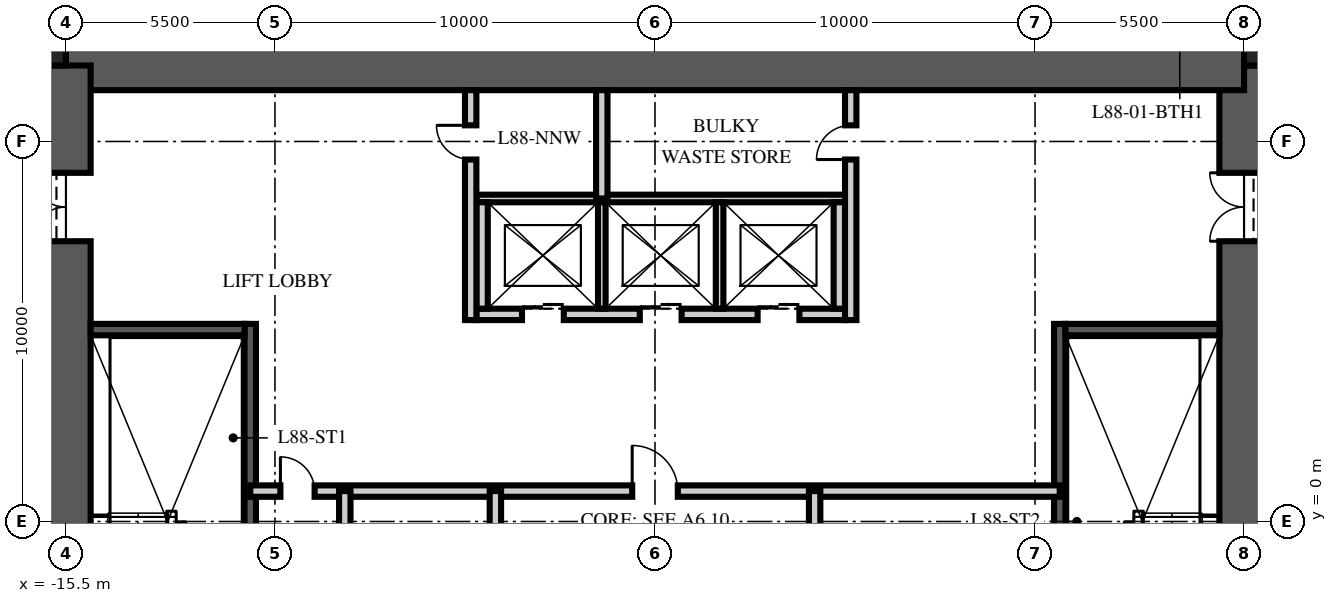
"""IFC4 building model, lengths in metres.
Left out: names, types, materials, properties, quantities, classifications, styles, units other than length and angle.
Written with IfcOpenShell. Run it as: python <this file> out.ifc"""

import sys

from ifc_helpers import new_model, si_unit, direction, frame, frame_2d, origin, origin_2d, place, context, subcontext, project, spatial, rectangle, extrude, element, fill, save


model = new_model("IFC4")
c1 = context("Model", 3, precision=1e-05, world=origin(), true_north=direction((0.0, 1.0)))
c2 = subcontext(c1, "Body", "Model", "MODEL_VIEW")
j1 = project(units=[si_unit("LENGTHUNIT", "METRE"), si_unit("PLANEANGLEUNIT", "RADIAN")], contexts=[c1])
p1 = place(None, origin())
s1 = spatial("IfcSite", under=j1, at=p1, CompositionType="ELEMENT")
p2 = place(p1, origin())
s2 = spatial("IfcBuilding", under=s1, at=p2, CompositionType="ELEMENT")
p3 = place(p2, frame((0.0, 0.0, 349.5)))
s3 = spatial("IfcBuildingStorey", under=s2, at=p3, CompositionType="ELEMENT", Elevation=349.5)
p4 = place(p3, frame((15.5, -12.0, -0.25), z_axis=(0.0, 0.0, 1.0), x_axis=(0.0, 1.0, 0.0)))
e1 = element("IfcWall", 1, at=p4, inside=s3, PredefinedType="SHEAR", context=c2, shape_type="SweptSolid", body=[
    extrude(rectangle(XDim=24.0, YDim=1.3, at=frame_2d((12.0, 0.0))), origin(), (0.0, 0.0, 1.0), 3.7),
])
p5 = place(p4, frame((3.125, 0.0, 0.25)))
e2 = element("IfcOpeningElement", 2, at=p5, cuts=e1, PredefinedType="OPENING", context=c2, shape_type="SweptSolid", body=[
    extrude(rectangle(XDim=1.2, YDim=2.1, at=frame_2d((0.6, 1.05))), frame((0.0, 0.66, 0.0), z_axis=(0.0, -1.0, 0.0), x_axis=(1.0, 0.0, 0.0)), (0.0, 0.0, 1.0), 1.32),
])
p6 = place(p4, frame((19.375, 0.0, 0.25)))
e3 = element("IfcOpeningElement", 3, at=p6, cuts=e1, PredefinedType="OPENING", context=c2, shape_type="SweptSolid", body=[
    extrude(rectangle(XDim=1.8, YDim=2.1, at=frame_2d((0.9, 1.05))), frame((0.0, 0.66, 0.0), z_axis=(0.0, -1.0, 0.0), x_axis=(1.0, 0.0, 0.0)), (0.0, 0.0, 1.0), 1.32),
])
p7 = place(p3, frame((-15.5, 12.0, -0.25), z_axis=(0.0, 0.0, 1.0), x_axis=(1.0, 0.0, 0.0)))
e4 = element("IfcWall", 4, at=p7, inside=s3, PredefinedType="SHEAR", context=c2, shape_type="SweptSolid", body=[
    extrude(rectangle(XDim=31.0, YDim=1.3, at=frame_2d((15.5, 0.0))), origin(), (0.0, 0.0, 1.0), 3.7),
])
p8 = place(p3, frame((-15.5, -12.0, -0.25), z_axis=(0.0, 0.0, 1.0), x_axis=(0.0, 1.0, 0.0)))
e5 = element("IfcWall", 5, at=p8, inside=s3, PredefinedType="SHEAR", context=c2, shape_type="SweptSolid", body=[
    extrude(rectangle(XDim=24.0, YDim=1.3, at=frame_2d((12.0, 0.0))), origin(), (0.0, 0.0, 1.0), 3.7),
])
p9 = place(p8, frame((3.125, 0.0, 0.25)))
e6 = element("IfcOpeningElement", 6, at=p9, cuts=e5, PredefinedType="OPENING", context=c2, shape_type="SweptSolid", body=[
    extrude(rectangle(XDim=1.2, YDim=2.1, at=frame_2d((0.6, 1.05))), frame((0.0, 0.66, 0.0), z_axis=(0.0, -1.0, 0.0), x_axis=(1.0, 0.0, 0.0)), (0.0, 0.0, 1.0), 1.32),
])
p10 = place(p8, frame((19.375, 0.0, 0.25)))
e7 = element("IfcOpeningElement", 7, at=p10, cuts=e5, PredefinedType="OPENING", context=c2, shape_type="SweptSolid", body=[
    extrude(rectangle(XDim=1.8, YDim=2.1, at=frame_2d((0.9, 1.05))), frame((0.0, 0.66, 0.0), z_axis=(0.0, -1.0, 0.0), x_axis=(1.0, 0.0, 0.0)), (0.0, 0.0, 1.0), 1.32),
])
for number, where, z_axis, x_axis in (
    (8, (15.825, 12.325, -0.25), (0.0, 0.0, 1.0), (1.0, 0.0, 0.0)),
    (9, (-15.825, 12.325, -0.25), (0.0, 0.0, 1.0), (1.0, 0.0, 0.0)),
):
    element("IfcColumn", number, at=place(p3, frame(where, z_axis=z_axis, x_axis=x_axis)), inside=s3, PredefinedType="COLUMN", context=c2, shape_type="SweptSolid", body=[
        extrude(rectangle(XDim=0.65, YDim=0.65, at=origin_2d()), origin(), (0.0, 0.0, 1.0), 3.7),
    ])
p11 = place(p3, frame((-10.65, -4.9, 0.0), z_axis=(0.0, 0.0, 1.0), x_axis=(0.0, 1.0, 0.0)))
e10 = element("IfcWall", 10, at=p11, inside=s3, PredefinedType="SOLIDWALL", context=c2, shape_type="SweptSolid", body=[
    extrude(rectangle(XDim=10.1, YDim=0.3, at=frame_2d((5.05, 0.0))), origin(), (0.0, 0.0, 1.0), 3.45),
])
p12 = place(p3, frame((-14.85, 5.05, 0.0), z_axis=(0.0, 0.0, 1.0), x_axis=(1.0, 0.0, 0.0)))
e11 = element("IfcWall", 11, at=p12, inside=s3, PredefinedType="SOLIDWALL", context=c2, shape_type="SweptSolid", body=[
    extrude(rectangle(XDim=4.05, YDim=0.3, at=frame_2d((2.025, 0.0))), origin(), (0.0, 0.0, 1.0), 3.45),
])
p13 = place(p3, frame((10.65, -4.9, 0.0), z_axis=(0.0, 0.0, 1.0), x_axis=(0.0, 1.0, 0.0)))
e12 = element("IfcWall", 12, at=p13, inside=s3, PredefinedType="SOLIDWALL", context=c2, shape_type="SweptSolid", body=[
    extrude(rectangle(XDim=10.1, YDim=0.3, at=frame_2d((5.05, 0.0))), origin(), (0.0, 0.0, 1.0), 3.45),
])
p14 = place(p3, frame((14.85, 5.05, 0.0), z_axis=(0.0, 0.0, 1.0), x_axis=(-1.0, 0.0, 0.0)))
e13 = element("IfcWall", 13, at=p14, inside=s3, PredefinedType="SOLIDWALL", context=c2, shape_type="SweptSolid", body=[
    extrude(rectangle(XDim=4.05, YDim=0.3, at=frame_2d((2.025, 0.0))), origin(), (0.0, 0.0, 1.0), 3.45),
])
p15 = place(p3, frame((-4.7, 5.45, 0.0), z_axis=(0.0, 0.0, 1.0), x_axis=(1.0, 0.0, 0.0)))
e14 = element("IfcWall", 14, at=p15, inside=s3, PredefinedType="PARTITIONING", context=c2, shape_type="SweptSolid", body=[
    extrude(rectangle(XDim=9.7, YDim=0.3, at=frame_2d((4.85, 0.0))), origin(), (0.0, 0.0, 1.0), 3.45),
])
p16 = place(p15, frame((1.2, 0.0, 0.0)))
e15 = element("IfcOpeningElement", 15, at=p16, cuts=e14, PredefinedType="OPENING", context=c2, shape_type="SweptSolid", body=[
    extrude(rectangle(XDim=1.1, YDim=2.1, at=frame_2d((0.55, 1.05))), frame((0.0, 0.16, 0.0), z_axis=(0.0, -1.0, 0.0), x_axis=(1.0, 0.0, 0.0)), (0.0, 0.0, 1.0), 0.32),
])
p17 = place(p15, frame((4.3, 0.0, 0.0)))
e16 = element("IfcOpeningElement", 16, at=p17, cuts=e14, PredefinedType="OPENING", context=c2, shape_type="SweptSolid", body=[
    extrude(rectangle(XDim=1.1, YDim=2.1, at=frame_2d((0.55, 1.05))), frame((0.0, 0.16, 0.0), z_axis=(0.0, -1.0, 0.0), x_axis=(1.0, 0.0, 0.0)), (0.0, 0.0, 1.0), 0.32),
])
p18 = place(p15, frame((7.4, 0.0, 0.0)))
e17 = element("IfcOpeningElement", 17, at=p18, cuts=e14, PredefinedType="OPENING", context=c2, shape_type="SweptSolid", body=[
    extrude(rectangle(XDim=1.1, YDim=2.1, at=frame_2d((0.55, 1.05))), frame((0.0, 0.16, 0.0), z_axis=(0.0, -1.0, 0.0), x_axis=(1.0, 0.0, 0.0)), (0.0, 0.0, 1.0), 0.32),
])
p19 = place(p3, frame((-4.7, 8.5, 0.0), z_axis=(0.0, 0.0, 1.0), x_axis=(1.0, 0.0, 0.0)))
e18 = element("IfcWall", 18, at=p19, inside=s3, PredefinedType="PARTITIONING", context=c2, shape_type="SweptSolid", body=[
    extrude(rectangle(XDim=9.7, YDim=0.2, at=frame_2d((4.85, 0.0))), origin(), (0.0, 0.0, 1.0), 3.45),
])
for number, where, z_axis, x_axis in (
    (19, (-4.55, 5.6, 0.0), (0.0, 0.0, 1.0), (0.0, 1.0, 0.0)),
    (20, (4.85, 5.6, 0.0), (0.0, 0.0, 1.0), (0.0, 1.0, 0.0)),
):
    element("IfcWall", number, at=place(p3, frame(where, z_axis=z_axis, x_axis=x_axis)), inside=s3, PredefinedType="PARTITIONING", context=c2, shape_type="SweptSolid", body=[
        extrude(rectangle(XDim=2.8, YDim=0.3, at=frame_2d((1.4, 0.0))), origin(), (0.0, 0.0, 1.0), 3.45),
    ])
for number, where, z_axis, x_axis in (
    (21, (-1.4, 5.6, 0.0), (0.0, 0.0, 1.0), (0.0, 1.0, 0.0)),
    (22, (1.7, 5.6, 0.0), (0.0, 0.0, 1.0), (0.0, 1.0, 0.0)),
):
    element("IfcWall", number, at=place(p3, frame(where, z_axis=z_axis, x_axis=x_axis)), inside=s3, PredefinedType="PARTITIONING", context=c2, shape_type="SweptSolid", body=[
        extrude(rectangle(XDim=2.8, YDim=0.2, at=frame_2d((1.4, 0.0))), origin(), (0.0, 0.0, 1.0), 3.45),
    ])
p20 = place(p3, frame((-10.65, 0.8, 0.0), z_axis=(0.0, 0.0, 1.0), x_axis=(1.0, 0.0, 0.0)))
e23 = element("IfcWall", 23, at=p20, inside=s3, PredefinedType="PARTITIONING", context=c2, shape_type="SweptSolid", body=[
    extrude(rectangle(XDim=21.3, YDim=0.3, at=frame_2d((10.65, 0.0))), origin(), (0.0, 0.0, 1.0), 3.45),
])
p21 = place(p20, frame((10.05, 0.0, 0.0)))
e24 = element("IfcOpeningElement", 24, at=p21, cuts=e23, PredefinedType="OPENING", context=c2, shape_type="SweptSolid", body=[
    extrude(rectangle(XDim=1.2, YDim=2.1, at=frame_2d((0.6, 1.05))), frame((0.0, 0.16, 0.0), z_axis=(0.0, -1.0, 0.0), x_axis=(1.0, 0.0, 0.0)), (0.0, 0.0, 1.0), 0.32),
])
p22 = place(p20, frame((0.793, 0.0, 0.0)))
e25 = element("IfcOpeningElement", 25, at=p22, cuts=e23, PredefinedType="OPENING", context=c2, shape_type="SweptSolid", body=[
    extrude(rectangle(XDim=0.9, YDim=2.1, at=frame_2d((0.45, 1.05))), frame((0.0, 0.16, 0.0), z_axis=(0.0, -1.0, 0.0), x_axis=(1.0, 0.0, 0.0)), (0.0, 0.0, 1.0), 0.32),
])
p23 = place(p3, frame((-4.2, -6.65, 0.0), z_axis=(0.0, 0.0, 1.0), x_axis=(0.0, 1.0, 0.0)))
e26 = element("IfcWall", 26, at=p23, inside=s3, PredefinedType="PARTITIONING", context=c2, shape_type="SweptSolid", body=[
    extrude(rectangle(XDim=7.45, YDim=0.3, at=frame_2d((3.725, 0.0))), origin(), (0.0, 0.0, 1.0), 3.45),
])
p24 = place(p23, frame((3.275, 0.0, 0.0)))
e27 = element("IfcOpeningElement", 27, at=p24, cuts=e26, PredefinedType="OPENING", context=c2, shape_type="SweptSolid", body=[
    extrude(rectangle(XDim=0.9, YDim=2.1, at=frame_2d((0.45, 1.05))), frame((0.0, 0.16, 0.0), z_axis=(0.0, -1.0, 0.0), x_axis=(1.0, 0.0, 0.0)), (0.0, 0.0, 1.0), 0.32),
])
p25 = place(p3, frame((4.2, -6.65, 0.0), z_axis=(0.0, 0.0, 1.0), x_axis=(0.0, 1.0, 0.0)))
e28 = element("IfcWall", 28, at=p25, inside=s3, PredefinedType="PARTITIONING", context=c2, shape_type="SweptSolid", body=[
    extrude(rectangle(XDim=7.45, YDim=0.3, at=frame_2d((3.725, 0.0))), origin(), (0.0, 0.0, 1.0), 3.45),
])
p26 = place(p25, frame((0.866, 0.0, 0.0)))
e29 = element("IfcOpeningElement", 29, at=p26, cuts=e28, PredefinedType="OPENING", context=c2, shape_type="SweptSolid", body=[
    extrude(rectangle(XDim=0.9, YDim=2.1, at=frame_2d((0.45, 1.05))), frame((0.0, 0.16, 0.0), z_axis=(0.0, -1.0, 0.0), x_axis=(1.0, 0.0, 0.0)), (0.0, 0.0, 1.0), 0.32),
])
p27 = place(p25, frame((4.591, 0.0, 0.0)))
e30 = element("IfcOpeningElement", 30, at=p27, cuts=e28, PredefinedType="OPENING", context=c2, shape_type="SweptSolid", body=[
    extrude(rectangle(XDim=0.9, YDim=2.1, at=frame_2d((0.45, 1.05))), frame((0.0, 0.16, 0.0), z_axis=(0.0, -1.0, 0.0), x_axis=(1.0, 0.0, 0.0)), (0.0, 0.0, 1.0), 0.32),
])
p28 = place(p3, frame((-8.163, -6.65, 0.0), z_axis=(0.0, 0.0, 1.0), x_axis=(0.0, 1.0, 0.0)))
e31 = element("IfcWall", 31, at=p28, inside=s3, PredefinedType="PARTITIONING", context=c2, shape_type="SweptSolid", body=[
    extrude(rectangle(XDim=7.45, YDim=0.3, at=frame_2d((3.725, 0.0))), origin(), (0.0, 0.0, 1.0), 3.45),
])
p29 = place(p3, frame((-4.85, 5.3, 0.0), z_axis=(0.0, 0.0, 1.0), x_axis=(0.0, 1.0, 0.0)))
e32 = element("IfcWall", 32, at=p29, inside=s3, PredefinedType="PARTITIONING", context=c2, shape_type="SweptSolid", body=[
    extrude(rectangle(XDim=6.05, YDim=0.3, at=frame_2d((3.025, 0.0))), origin(), (0.0, 0.0, 1.0), 3.45),
])
p30 = place(p29, frame((4.225, 0.0, 0.0)))
e33 = element("IfcOpeningElement", 33, at=p30, cuts=e32, PredefinedType="OPENING", context=c2, shape_type="SweptSolid", body=[
    extrude(rectangle(XDim=0.9, YDim=2.1, at=frame_2d((0.45, 1.05))), frame((0.0, 0.16, 0.0), z_axis=(0.0, -1.0, 0.0), x_axis=(1.0, 0.0, 0.0)), (0.0, 0.0, 1.0), 0.32),
])
p31 = place(p3, frame((5.15, 5.3, 0.0), z_axis=(0.0, 0.0, 1.0), x_axis=(0.0, 1.0, 0.0)))
e34 = element("IfcWall", 34, at=p31, inside=s3, PredefinedType="PARTITIONING", context=c2, shape_type="SweptSolid", body=[
    extrude(rectangle(XDim=6.05, YDim=0.3, at=frame_2d((3.025, 0.0))), origin(), (0.0, 0.0, 1.0), 3.45),
])
p32 = place(p31, frame((4.225, 0.0, 0.0)))
e35 = element("IfcOpeningElement", 35, at=p32, cuts=e34, PredefinedType="OPENING", context=c2, shape_type="SweptSolid", body=[
    extrude(rectangle(XDim=0.9, YDim=2.1, at=frame_2d((0.45, 1.05))), frame((0.0, 0.16, 0.0), z_axis=(0.0, -1.0, 0.0), x_axis=(1.0, 0.0, 0.0)), (0.0, 0.0, 1.0), 0.32),
])
p33 = place(p3, frame((-1.4, 8.5, 0.0), z_axis=(0.0, 0.0, 1.0), x_axis=(0.0, 1.0, 0.0)))
e36 = element("IfcWall", 36, at=p33, inside=s3, PredefinedType="PARTITIONING", context=c2, shape_type="SweptSolid", body=[
    extrude(rectangle(XDim=2.85, YDim=0.3, at=frame_2d((1.425, 0.0))), origin(), (0.0, 0.0, 1.0), 3.45),
])
p34 = place(p10, origin())
e37 = element("IfcDoor", 37, at=p34, inside=s3, OperationType="DOUBLE_DOOR_SINGLE_SWING", PredefinedType="DOOR", context=c2, shape_type="SweptSolid", body=[
    extrude(rectangle(XDim=1.8, YDim=2.1, at=frame_2d((0.9, 1.05))), frame((0.0, 0.025, 0.0), z_axis=(0.0, -1.0, 0.0), x_axis=(1.0, 0.0, 0.0)), (0.0, 0.0, 1.0), 0.05),
])
fill(e7, e37)
p35 = place(p6, origin())
e38 = element("IfcDoor", 38, at=p35, inside=s3, OperationType="DOUBLE_DOOR_SINGLE_SWING", PredefinedType="DOOR", context=c2, shape_type="SweptSolid", body=[
    extrude(rectangle(XDim=1.8, YDim=2.1, at=frame_2d((0.9, 1.05))), frame((0.0, 0.025, 0.0), z_axis=(0.0, -1.0, 0.0), x_axis=(1.0, 0.0, 0.0)), (0.0, 0.0, 1.0), 0.05),
])
fill(e3, e38)
p36 = place(p16, origin())
e39 = element("IfcDoor", 39, at=p36, inside=s3, OperationType="DOUBLE_DOOR_SLIDING", PredefinedType="DOOR", context=c2, shape_type="SweptSolid", body=[
    extrude(rectangle(XDim=1.1, YDim=2.1, at=frame_2d((0.55, 1.05))), frame((0.0, 0.025, 0.0), z_axis=(0.0, -1.0, 0.0), x_axis=(1.0, 0.0, 0.0)), (0.0, 0.0, 1.0), 0.05),
])
fill(e15, e39)
p37 = place(p17, origin())
e40 = element("IfcDoor", 40, at=p37, inside=s3, OperationType="DOUBLE_DOOR_SLIDING", PredefinedType="DOOR", context=c2, shape_type="SweptSolid", body=[
    extrude(rectangle(XDim=1.1, YDim=2.1, at=frame_2d((0.55, 1.05))), frame((0.0, 0.025, 0.0), z_axis=(0.0, -1.0, 0.0), x_axis=(1.0, 0.0, 0.0)), (0.0, 0.0, 1.0), 0.05),
])
fill(e16, e40)
p38 = place(p18, origin())
e41 = element("IfcDoor", 41, at=p38, inside=s3, OperationType="DOUBLE_DOOR_SLIDING", PredefinedType="DOOR", context=c2, shape_type="SweptSolid", body=[
    extrude(rectangle(XDim=1.1, YDim=2.1, at=frame_2d((0.55, 1.05))), frame((0.0, 0.025, 0.0), z_axis=(0.0, -1.0, 0.0), x_axis=(1.0, 0.0, 0.0)), (0.0, 0.0, 1.0), 0.05),
])
fill(e17, e41)
p39 = place(p21, origin())
e42 = element("IfcDoor", 42, at=p39, inside=s3, OperationType="SINGLE_SWING_LEFT", PredefinedType="DOOR", context=c2, shape_type="SweptSolid", body=[
    extrude(rectangle(XDim=1.2, YDim=2.1, at=frame_2d((0.6, 1.05))), frame((0.0, 0.025, 0.0), z_axis=(0.0, -1.0, 0.0), x_axis=(1.0, 0.0, 0.0)), (0.0, 0.0, 1.0), 0.05),
])
fill(e24, e42)
p40 = place(p22, origin())
e43 = element("IfcDoor", 43, at=p40, inside=s3, OperationType="SINGLE_SWING_LEFT", PredefinedType="DOOR", context=c2, shape_type="SweptSolid", body=[
    extrude(rectangle(XDim=0.9, YDim=2.1, at=frame_2d((0.45, 1.05))), frame((0.0, 0.025, 0.0), z_axis=(0.0, -1.0, 0.0), x_axis=(1.0, 0.0, 0.0)), (0.0, 0.0, 1.0), 0.05),
])
fill(e25, e43)
p41 = place(p30, origin())
e44 = element("IfcDoor", 44, at=p41, inside=s3, OperationType="SINGLE_SWING_RIGHT", PredefinedType="DOOR", context=c2, shape_type="SweptSolid", body=[
    extrude(rectangle(XDim=0.9, YDim=2.1, at=frame_2d((0.45, 1.05))), frame((0.0, 0.025, 0.0), z_axis=(0.0, -1.0, 0.0), x_axis=(1.0, 0.0, 0.0)), (0.0, 0.0, 1.0), 0.05),
])
fill(e33, e44)
p42 = place(p32, origin())
e45 = element("IfcDoor", 45, at=p42, inside=s3, OperationType="SINGLE_SWING_LEFT", PredefinedType="DOOR", context=c2, shape_type="SweptSolid", body=[
    extrude(rectangle(XDim=0.9, YDim=2.1, at=frame_2d((0.45, 1.05))), frame((0.0, 0.025, 0.0), z_axis=(0.0, -1.0, 0.0), x_axis=(1.0, 0.0, 0.0)), (0.0, 0.0, 1.0), 0.05),
])
fill(e35, e45)
save(model, sys.argv[1])
